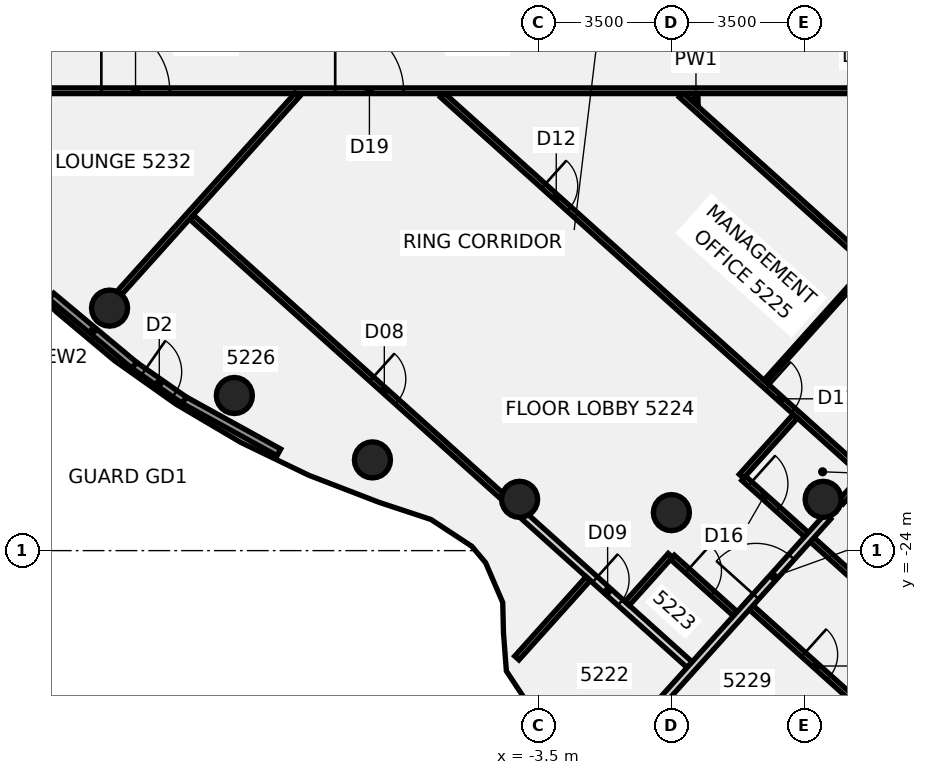
"""IFC4 building model, lengths in metres.
Left out: names, types, materials, properties, quantities, classifications, styles, units other than length and angle.
Written with IfcOpenShell. Run it as: python <this file> out.ifc"""

import sys

from ifc_helpers import new_model, si_unit, direction, frame, frame_2d, origin, origin_2d, place, context, subcontext, project, spatial, rectangle, circle, extrude, element, fill, save


model = new_model("IFC4")
c1 = context("Model", 3, precision=1e-05, world=origin(), true_north=direction((0.0, 1.0)))
c2 = subcontext(c1, "Body", "Model", "MODEL_VIEW")
j1 = project(units=[si_unit("LENGTHUNIT", "METRE"), si_unit("PLANEANGLEUNIT", "RADIAN")], contexts=[c1])
p1 = place(None, origin())
s1 = spatial("IfcSite", under=j1, at=p1, CompositionType="ELEMENT")
p2 = place(p1, origin())
s2 = spatial("IfcBuilding", under=s1, at=p2, CompositionType="ELEMENT")
p3 = place(p2, frame((0.0, 0.0, 207.7)))
s3 = spatial("IfcBuildingStorey", under=s2, at=p3, CompositionType="ELEMENT", Elevation=207.7)
for number, where, z_axis, x_axis in (
    (1, (-14.784, -17.619, -0.14), (0.0, 0.0, 1.0), (1.0, 0.0, 0.0)),
    (2, (-11.5, -19.919, -0.14), (0.0, 0.0, 1.0), (1.0, 0.0, 0.0)),
    (3, (-7.866, -21.613, -0.14), (0.0, 0.0, 1.0), (1.0, 0.0, 0.0)),
    (4, (-3.994, -22.651, -0.14), (0.0, 0.0, 1.0), (1.0, 0.0, 0.0)),
    (5, (0.0, -23.0, -0.14), (0.0, 0.0, 1.0), (1.0, 0.0, 0.0)),
    (6, (3.994, -22.651, -0.14), (0.0, 0.0, 1.0), (1.0, 0.0, 0.0)),
):
    element("IfcColumn", number, at=place(p3, frame(where, z_axis=z_axis, x_axis=x_axis)), inside=s3, PredefinedType="COLUMN", context=c2, shape_type="SweptSolid", body=[
        extrude(circle(Radius=0.475, at=origin_2d()), origin(), (0.0, 0.0, 1.0), 3.6),
    ])
p4 = place(p3, frame((0.639, -11.96, 0.0), z_axis=(0.0, 0.0, 1.0), x_axis=(0.05343233318, -0.99857147254, 0.0)))
e7 = element("IfcWall", 7, at=p4, inside=s3, PredefinedType="PARTITIONING", context=c2, shape_type="SweptSolid", body=[
    extrude(rectangle(XDim=0.279, YDim=0.1, at=frame_2d((0.139, 0.0))), origin(), (0.0, 0.0, 1.0), 2.864),
])
p5 = place(p3, frame((-12.626, -15.226, 0.0), z_axis=(0.0, 0.0, 1.0), x_axis=(0.743821581371, -0.668378227567, 0.0)))
e8 = element("IfcWall", 8, at=p5, inside=s3, PredefinedType="PARTITIONING", context=c2, shape_type="SweptSolid", body=[
    extrude(rectangle(XDim=11.158, YDim=0.15, at=frame_2d((5.579, 0.0))), origin(), (0.0, 0.0, 1.0), 2.864),
])
p6 = place(p5, frame((6.37, 0.0, 0.0)))
e9 = element("IfcOpeningElement", 9, at=p6, cuts=e8, PredefinedType="OPENING", context=c2, shape_type="SweptSolid", body=[
    extrude(rectangle(XDim=0.9, YDim=2.1, at=frame_2d((0.45, 1.05))), frame((0.0, 0.085, 0.0), z_axis=(0.0, -1.0, 0.0), x_axis=(1.0, 0.0, 0.0)), (0.0, 0.0, 1.0), 0.17),
])
p7 = place(p3, frame((-3.992, -22.984, 0.0), z_axis=(0.0, 0.0, 1.0), x_axis=(0.743806821258, -0.668394653368, 0.0)))
e10 = element("IfcWall", 10, at=p7, inside=s3, PredefinedType="PARTITIONING", context=c2, shape_type="SweptSolid", body=[
    extrude(rectangle(XDim=6.012, YDim=0.2, at=frame_2d((3.006, 0.0))), origin(), (0.0, 0.0, 1.0), 2.864),
])
p8 = place(p7, frame((2.662, 0.0, 0.0)))
e11 = element("IfcOpeningElement", 11, at=p8, cuts=e10, PredefinedType="OPENING", context=c2, shape_type="SweptSolid", body=[
    extrude(rectangle(XDim=0.9, YDim=2.1, at=frame_2d((0.45, 1.05))), frame((0.0, 0.11, 0.0), z_axis=(0.0, -1.0, 0.0), x_axis=(1.0, 0.0, 0.0)), (0.0, 0.0, 1.0), 0.22),
])
p9 = place(p3, frame((-6.028, -12.014, 0.0), z_axis=(0.0, 0.0, 1.0), x_axis=(0.743847907663, -0.668348928528, 0.0)))
e12 = element("IfcWall", 12, at=p9, inside=s3, PredefinedType="PARTITIONING", context=c2, shape_type="SweptSolid", body=[
    extrude(rectangle(XDim=14.878, YDim=0.15, at=frame_2d((7.439, 0.0))), origin(), (0.0, 0.0, 1.0), 2.864),
])
p10 = place(p9, frame((11.508, 0.0, 0.0)))
e13 = element("IfcOpeningElement", 13, at=p10, cuts=e12, PredefinedType="OPENING", context=c2, shape_type="SweptSolid", body=[
    extrude(rectangle(XDim=0.9, YDim=2.1, at=frame_2d((0.45, 1.05))), frame((0.0, 0.085, 0.0), z_axis=(0.0, -1.0, 0.0), x_axis=(1.0, 0.0, 0.0)), (0.0, 0.0, 1.0), 0.17),
])
p11 = place(p9, frame((3.58, 0.0, 0.0)))
e14 = element("IfcOpeningElement", 14, at=p11, cuts=e12, PredefinedType="OPENING", context=c2, shape_type="SweptSolid", body=[
    extrude(rectangle(XDim=0.9, YDim=2.1, at=frame_2d((0.45, 1.05))), frame((0.0, 0.085, 0.0), z_axis=(0.0, -1.0, 0.0), x_axis=(1.0, 0.0, 0.0)), (0.0, 0.0, 1.0), 0.17),
])
p12 = place(p3, frame((0.028, -24.176, 0.0), z_axis=(0.0, 0.0, 1.0), x_axis=(0.743795937291, -0.668406765128, 0.0)))
e15 = element("IfcWall", 15, at=p12, inside=s3, PredefinedType="PARTITIONING", context=c2, shape_type="SweptSolid", body=[
    extrude(rectangle(XDim=2.225, YDim=0.15, at=frame_2d((1.112, 0.0))), origin(), (0.0, 0.0, 1.0), 2.864),
])
p13 = place(p12, frame((0.525, 0.0, 0.0)))
e16 = element("IfcOpeningElement", 16, at=p13, cuts=e15, PredefinedType="OPENING", context=c2, shape_type="SweptSolid", body=[
    extrude(rectangle(XDim=0.9, YDim=2.1, at=frame_2d((0.45, 1.05))), frame((0.0, 0.085, 0.0), z_axis=(0.0, -1.0, 0.0), x_axis=(1.0, 0.0, 0.0)), (0.0, 0.0, 1.0), 0.17),
])
p14 = place(p3, frame((0.257, -12.014, 0.0), z_axis=(0.0, 0.0, 1.0), x_axis=(0.743888362664, -0.668303900851, 0.0)))
e17 = element("IfcWall", 17, at=p14, inside=s3, PredefinedType="PARTITIONING", context=c2, shape_type="SweptSolid", body=[
    extrude(rectangle(XDim=15.866, YDim=0.15, at=frame_2d((7.933, 0.0))), origin(), (0.0, 0.0, 1.0), 2.864),
])
p15 = place(p3, frame((1.903, -22.096, 0.0), z_axis=(0.0, 0.0, 1.0), x_axis=(0.743993617253, -0.668186723518, 0.0)))
e18 = element("IfcWall", 18, at=p15, inside=s3, PredefinedType="PARTITIONING", context=c2, shape_type="SweptSolid", body=[
    extrude(rectangle(XDim=11.24, YDim=0.15, at=frame_2d((5.62, 0.0))), origin(), (0.0, 0.0, 1.0), 2.864),
])
p16 = place(p15, frame((0.22, 0.0, 0.0)))
e19 = element("IfcOpeningElement", 19, at=p16, cuts=e18, PredefinedType="OPENING", context=c2, shape_type="SweptSolid", body=[
    extrude(rectangle(XDim=1.0, YDim=2.1, at=frame_2d((0.5, 1.05))), frame((0.0, 0.085, 0.0), z_axis=(0.0, -1.0, 0.0), x_axis=(1.0, 0.0, 0.0)), (0.0, 0.0, 1.0), 0.17),
])
p17 = place(p15, frame((6.22, 0.0, 0.0)))
e20 = element("IfcOpeningElement", 20, at=p17, cuts=e18, PredefinedType="OPENING", context=c2, shape_type="SweptSolid", body=[
    extrude(rectangle(XDim=0.9, YDim=2.1, at=frame_2d((0.45, 1.05))), frame((0.0, 0.085, 0.0), z_axis=(0.0, -1.0, 0.0), x_axis=(1.0, 0.0, 0.0)), (0.0, 0.0, 1.0), 0.17),
])
p18 = place(p3, frame((2.099, -25.499, 0.0), z_axis=(0.0, 0.0, 1.0), x_axis=(0.743772051114, -0.668433344457, 0.0)))
e21 = element("IfcWall", 21, at=p18, inside=s3, PredefinedType="PARTITIONING", context=c2, shape_type="SweptSolid", body=[
    extrude(rectangle(XDim=3.86, YDim=0.15, at=frame_2d((1.93, 0.0))), origin(), (0.0, 0.0, 1.0), 2.864),
])
p19 = place(p18, frame((1.85, 0.0, 0.0)))
e22 = element("IfcOpeningElement", 22, at=p19, cuts=e21, PredefinedType="OPENING", context=c2, shape_type="SweptSolid", body=[
    extrude(rectangle(XDim=0.9, YDim=2.1, at=frame_2d((0.45, 1.05))), frame((0.0, 0.085, 0.0), z_axis=(0.0, -1.0, 0.0), x_axis=(1.0, 0.0, 0.0)), (0.0, 0.0, 1.0), 0.17),
])
p20 = place(p3, frame((-17.1, -11.9, 0.0), z_axis=(0.0, 0.0, 1.0), x_axis=(1.0, 0.0, 0.0)))
e23 = element("IfcWall", 23, at=p20, inside=s3, PredefinedType="PARTITIONING", context=c2, shape_type="SweptSolid", body=[
    extrude(rectangle(XDim=34.165, YDim=0.15, at=frame_2d((17.083, 0.0))), origin(), (0.0, 0.0, 1.0), 2.864),
])
p21 = place(p20, frame((8.254, 0.0, 0.0)))
e24 = element("IfcOpeningElement", 24, at=p21, cuts=e23, PredefinedType="OPENING", context=c2, shape_type="SweptSolid", body=[
    extrude(rectangle(XDim=1.8, YDim=2.1, at=frame_2d((0.9, 1.05))), frame((0.0, 0.085, 0.0), z_axis=(0.0, -1.0, 0.0), x_axis=(1.0, 0.0, 0.0)), (0.0, 0.0, 1.0), 0.17),
])
p22 = place(p20, frame((2.1, 0.0, 0.0)))
e25 = element("IfcOpeningElement", 25, at=p22, cuts=e23, PredefinedType="OPENING", context=c2, shape_type="SweptSolid", body=[
    extrude(rectangle(XDim=1.8, YDim=2.1, at=frame_2d((0.9, 1.05))), frame((0.0, 0.085, 0.0), z_axis=(0.0, -1.0, 0.0), x_axis=(1.0, 0.0, 0.0)), (0.0, 0.0, 1.0), 0.17),
])
p23 = place(p20, frame((24.936, 0.0, 0.0)))
e26 = element("IfcOpeningElement", 26, at=p23, cuts=e23, PredefinedType="OPENING", context=c2, shape_type="SweptSolid", body=[
    extrude(rectangle(XDim=1.8, YDim=2.1, at=frame_2d((0.9, 1.05))), frame((0.0, 0.085, 0.0), z_axis=(0.0, -1.0, 0.0), x_axis=(1.0, 0.0, 0.0)), (0.0, 0.0, 1.0), 0.17),
])
p24 = place(p3, frame((-14.523, -17.217, 0.0), z_axis=(0.0, 0.0, 1.0), x_axis=(0.668288418093, 0.743902271971, 0.0)))
e27 = element("IfcWall", 27, at=p24, inside=s3, PredefinedType="PARTITIONING", context=c2, shape_type="SweptSolid", body=[
    extrude(rectangle(XDim=7.003, YDim=0.15, at=frame_2d((3.501, 0.0))), origin(), (0.0, 0.0, 1.0), 2.864),
])
p25 = place(p3, frame((-4.066, -26.825, 0.0), z_axis=(0.0, 0.0, 1.0), x_axis=(0.668253130182, 0.743933971533, 0.0)))
e28 = element("IfcWall", 28, at=p25, inside=s3, PredefinedType="PARTITIONING", context=c2, shape_type="SweptSolid", body=[
    extrude(rectangle(XDim=2.807, YDim=0.15, at=frame_2d((1.403, 0.0))), origin(), (0.0, 0.0, 1.0), 2.864),
])
p26 = place(p3, frame((2.474, -19.545, 0.0), z_axis=(0.0, 0.0, 1.0), x_axis=(0.668257628932, 0.74392993042, 0.0)))
e29 = element("IfcWall", 29, at=p26, inside=s3, PredefinedType="PARTITIONING", context=c2, shape_type="SweptSolid", body=[
    extrude(rectangle(XDim=4.046, YDim=0.1, at=frame_2d((2.023, 0.0))), origin(), (0.0, 0.0, 1.0), 2.864),
])
p27 = place(p3, frame((-1.65, -29.523, 0.0), z_axis=(0.0, 0.0, 1.0), x_axis=(0.668276838346, 0.743912674532, 0.0)))
e30 = element("IfcWall", 30, at=p27, inside=s3, PredefinedType="PARTITIONING", context=c2, shape_type="SweptSolid", body=[
    extrude(rectangle(XDim=8.631, YDim=0.2, at=frame_2d((4.316, 0.0))), origin(), (0.0, 0.0, 1.0), 2.864),
])
p28 = place(p27, frame((5.8, 0.0, 0.0)))
e31 = element("IfcOpeningElement", 31, at=p28, cuts=e30, PredefinedType="OPENING", context=c2, shape_type="SweptSolid", body=[
    extrude(rectangle(XDim=1.4, YDim=2.1, at=frame_2d((0.7, 1.05))), frame((0.0, 0.11, 0.0), z_axis=(0.0, -1.0, 0.0), x_axis=(1.0, 0.0, 0.0)), (0.0, 0.0, 1.0), 0.22),
])
p29 = place(p3, frame((4.46, -22.722, 0.0), z_axis=(0.0, 0.0, 1.0), x_axis=(0.668268268687, 0.7439203728, 0.0)))
e32 = element("IfcWall", 32, at=p29, inside=s3, PredefinedType="PARTITIONING", context=c2, shape_type="SweptSolid", body=[
    extrude(rectangle(XDim=5.076, YDim=0.15, at=frame_2d((2.538, 0.0))), origin(), (0.0, 0.0, 1.0), 2.864),
])
p30 = place(p3, frame((-1.164, -25.391, 0.0), z_axis=(0.0, 0.0, 1.0), x_axis=(0.668329776991, 0.743865114915, 0.0)))
e33 = element("IfcWall", 33, at=p30, inside=s3, PredefinedType="PARTITIONING", context=c2, shape_type="SweptSolid", body=[
    extrude(rectangle(XDim=1.7, YDim=0.15, at=frame_2d((0.85, 0.0))), origin(), (0.0, 0.0, 1.0), 2.864),
])
p31 = place(p3, frame((1.843, -22.043, 0.0), z_axis=(0.0, 0.0, 1.0), x_axis=(0.668264577011, 0.743923689038, 0.0)))
e34 = element("IfcWall", 34, at=p31, inside=s3, PredefinedType="PARTITIONING", context=c2, shape_type="SweptSolid", body=[
    extrude(rectangle(XDim=2.12, YDim=0.15, at=frame_2d((1.06, 0.0))), origin(), (0.0, 0.0, 1.0), 2.864),
])
p32 = place(p3, frame((-16.315, -17.304, 0.0), z_axis=(0.0, 0.0, 1.0), x_axis=(0.767848233203, -0.640631790318, 0.0)))
e35 = element("IfcWall", 35, at=p32, inside=s3, PredefinedType="SOLIDWALL", context=c2, shape_type="SweptSolid", body=[
    extrude(rectangle(XDim=2.844, YDim=0.2, at=frame_2d((1.422, 0.0))), origin(), (0.0, 0.0, 1.0), 3.46),
])
p33 = place(p3, frame((-12.82, -20.042, 0.0), z_axis=(0.0, 0.0, 1.0), x_axis=(0.87571533724, -0.482827762378, 0.0)))
e36 = element("IfcWall", 36, at=p33, inside=s3, PredefinedType="SOLIDWALL", context=c2, shape_type="SweptSolid", body=[
    extrude(rectangle(XDim=2.845, YDim=0.2, at=frame_2d((1.422, 0.0))), origin(), (0.0, 0.0, 1.0), 3.46),
])
p34 = place(p3, frame((-14.132, -19.126, 0.0), z_axis=(0.0, 0.0, 1.0), x_axis=(0.820148605053, -0.572150562029, 0.0)))
e37 = element("IfcWall", 37, at=p34, inside=s3, PredefinedType="SOLIDWALL", context=c2, shape_type="SweptSolid", body=[
    extrude(rectangle(XDim=1.6, YDim=0.2, at=frame_2d((0.8, 0.0))), origin(), (0.0, 0.0, 1.0), 3.46),
])
p35 = place(p34, frame((0.3, 0.0, 0.0)))
e38 = element("IfcOpeningElement", 38, at=p35, cuts=e37, PredefinedType="OPENING", context=c2, shape_type="SweptSolid", body=[
    extrude(rectangle(XDim=1.0, YDim=2.4, at=frame_2d((0.5, 1.2))), frame((0.0, 0.11, 0.0), z_axis=(0.0, -1.0, 0.0), x_axis=(1.0, 0.0, 0.0)), (0.0, 0.0, 1.0), 0.22),
])
p36 = place(p6, frame((0.9, 0.0, 0.0), z_axis=(0.0, 0.0, 1.0), x_axis=(-1.0, 0.0, 0.0)))
e39 = element("IfcDoor", 39, at=p36, inside=s3, OperationType="SINGLE_SWING_RIGHT", PredefinedType="DOOR", context=c2, shape_type="SweptSolid", body=[
    extrude(rectangle(XDim=0.9, YDim=2.1, at=frame_2d((0.45, 1.05))), frame((0.0, 0.025, 0.0), z_axis=(0.0, -1.0, 0.0), x_axis=(1.0, 0.0, 0.0)), (0.0, 0.0, 1.0), 0.05),
])
fill(e9, e39)
p37 = place(p8, frame((0.9, 0.0, 0.0), z_axis=(0.0, 0.0, 1.0), x_axis=(-1.0, 0.0, 0.0)))
e40 = element("IfcDoor", 40, at=p37, inside=s3, OperationType="SINGLE_SWING_RIGHT", PredefinedType="DOOR", context=c2, shape_type="SweptSolid", body=[
    extrude(rectangle(XDim=0.9, YDim=2.1, at=frame_2d((0.45, 1.05))), frame((0.0, 0.025, 0.0), z_axis=(0.0, -1.0, 0.0), x_axis=(1.0, 0.0, 0.0)), (0.0, 0.0, 1.0), 0.05),
])
fill(e11, e40)
p38 = place(p10, origin())
e41 = element("IfcDoor", 41, at=p38, inside=s3, OperationType="SINGLE_SWING_LEFT", PredefinedType="DOOR", context=c2, shape_type="SweptSolid", body=[
    extrude(rectangle(XDim=0.9, YDim=2.1, at=frame_2d((0.45, 1.05))), frame((0.0, 0.025, 0.0), z_axis=(0.0, -1.0, 0.0), x_axis=(1.0, 0.0, 0.0)), (0.0, 0.0, 1.0), 0.05),
])
fill(e13, e41)
p39 = place(p11, origin())
e42 = element("IfcDoor", 42, at=p39, inside=s3, OperationType="SINGLE_SWING_RIGHT", PredefinedType="DOOR", context=c2, shape_type="SweptSolid", body=[
    extrude(rectangle(XDim=0.9, YDim=2.1, at=frame_2d((0.45, 1.05))), frame((0.0, 0.025, 0.0), z_axis=(0.0, -1.0, 0.0), x_axis=(1.0, 0.0, 0.0)), (0.0, 0.0, 1.0), 0.05),
])
fill(e14, e42)
p40 = place(p13, frame((0.9, 0.0, 0.0), z_axis=(0.0, 0.0, 1.0), x_axis=(-1.0, 0.0, 0.0)))
e43 = element("IfcDoor", 43, at=p40, inside=s3, OperationType="SINGLE_SWING_LEFT", PredefinedType="DOOR", context=c2, shape_type="SweptSolid", body=[
    extrude(rectangle(XDim=0.9, YDim=2.1, at=frame_2d((0.45, 1.05))), frame((0.0, 0.025, 0.0), z_axis=(0.0, -1.0, 0.0), x_axis=(1.0, 0.0, 0.0)), (0.0, 0.0, 1.0), 0.05),
])
fill(e16, e43)
p41 = place(p16, origin())
e44 = element("IfcDoor", 44, at=p41, inside=s3, OperationType="SINGLE_SWING_RIGHT", PredefinedType="DOOR", context=c2, shape_type="SweptSolid", body=[
    extrude(rectangle(XDim=1.0, YDim=2.1, at=frame_2d((0.5, 1.05))), frame((0.0, 0.025, 0.0), z_axis=(0.0, -1.0, 0.0), x_axis=(1.0, 0.0, 0.0)), (0.0, 0.0, 1.0), 0.05),
])
fill(e19, e44)
p42 = place(p19, frame((0.9, 0.0, 0.0), z_axis=(0.0, 0.0, 1.0), x_axis=(-1.0, 0.0, 0.0)))
e45 = element("IfcDoor", 45, at=p42, inside=s3, OperationType="SINGLE_SWING_RIGHT", PredefinedType="DOOR", context=c2, shape_type="SweptSolid", body=[
    extrude(rectangle(XDim=0.9, YDim=2.1, at=frame_2d((0.45, 1.05))), frame((0.0, 0.025, 0.0), z_axis=(0.0, -1.0, 0.0), x_axis=(1.0, 0.0, 0.0)), (0.0, 0.0, 1.0), 0.05),
])
fill(e22, e45)
p43 = place(p21, origin())
e46 = element("IfcDoor", 46, at=p43, inside=s3, OperationType="DOUBLE_DOOR_SINGLE_SWING", PredefinedType="DOOR", context=c2, shape_type="SweptSolid", body=[
    extrude(rectangle(XDim=1.8, YDim=2.1, at=frame_2d((0.9, 1.05))), frame((0.0, 0.025, 0.0), z_axis=(0.0, -1.0, 0.0), x_axis=(1.0, 0.0, 0.0)), (0.0, 0.0, 1.0), 0.05),
])
fill(e24, e46)
p44 = place(p22, frame((1.8, 0.0, 0.0), z_axis=(0.0, 0.0, 1.0), x_axis=(-1.0, 0.0, 0.0)))
e47 = element("IfcDoor", 47, at=p44, inside=s3, OperationType="DOUBLE_DOOR_SINGLE_SWING", PredefinedType="DOOR", context=c2, shape_type="SweptSolid", body=[
    extrude(rectangle(XDim=1.8, YDim=2.1, at=frame_2d((0.9, 1.05))), frame((0.0, 0.025, 0.0), z_axis=(0.0, -1.0, 0.0), x_axis=(1.0, 0.0, 0.0)), (0.0, 0.0, 1.0), 0.05),
])
fill(e25, e47)
p45 = place(p28, origin())
e48 = element("IfcDoor", 48, at=p45, inside=s3, OperationType="DOUBLE_DOOR_SINGLE_SWING", PredefinedType="DOOR", context=c2, shape_type="SweptSolid", body=[
    extrude(rectangle(XDim=1.4, YDim=2.1, at=frame_2d((0.7, 1.05))), frame((0.0, 0.025, 0.0), z_axis=(0.0, -1.0, 0.0), x_axis=(1.0, 0.0, 0.0)), (0.0, 0.0, 1.0), 0.05),
])
fill(e31, e48)
p46 = place(p35, origin())
e49 = element("IfcDoor", 49, at=p46, inside=s3, OperationType="SINGLE_SWING_LEFT", PredefinedType="DOOR", context=c2, shape_type="SweptSolid", body=[
    extrude(rectangle(XDim=1.0, YDim=2.4, at=frame_2d((0.5, 1.2))), frame((0.0, 0.025, 0.0), z_axis=(0.0, -1.0, 0.0), x_axis=(1.0, 0.0, 0.0)), (0.0, 0.0, 1.0), 0.05),
])
fill(e38, e49)
save(model, sys.argv[1])
